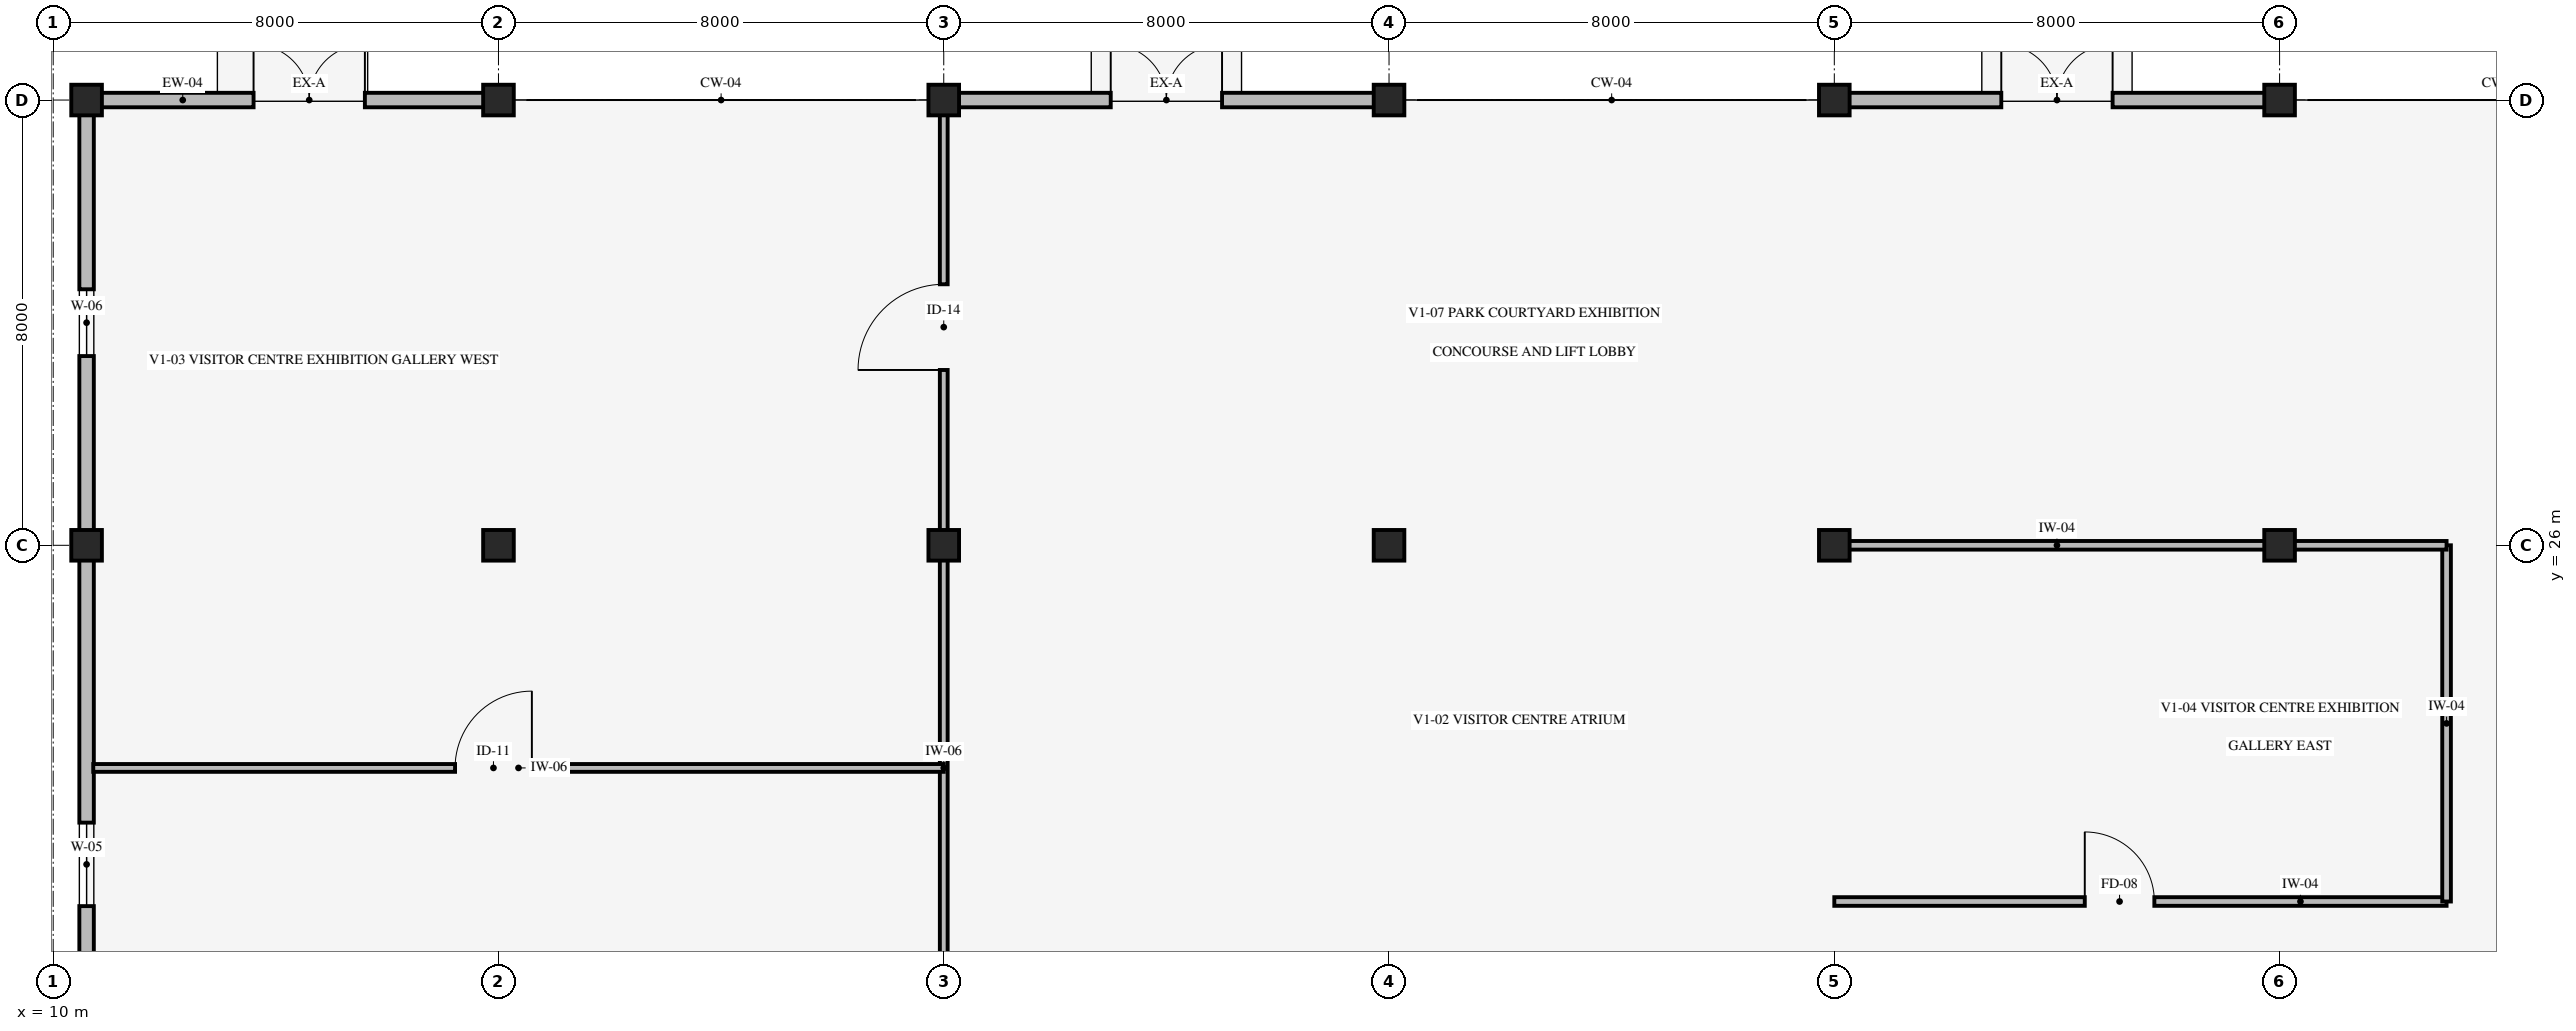
"""IFC4 building model, lengths in metres.
Left out: names, types, materials, properties, quantities, classifications, styles, units other than length and angle.
Written with IfcOpenShell. Run it as: python <this file> out.ifc"""

import sys

from ifc_helpers import new_model, si_unit, direction, frame, frame_2d, origin, origin_2d, place, context, subcontext, project, spatial, rectangle, extrude, element, fill, save


model = new_model("IFC4")
c1 = context("Model", 3, precision=1e-05, world=origin(), true_north=direction((0.0, 1.0)))
c2 = subcontext(c1, "Body", "Model", "MODEL_VIEW")
j1 = project(units=[si_unit("LENGTHUNIT", "METRE"), si_unit("PLANEANGLEUNIT", "RADIAN")], contexts=[c1])
p1 = place(None, origin())
s1 = spatial("IfcSite", under=j1, at=p1, CompositionType="ELEMENT")
p2 = place(p1, origin())
s2 = spatial("IfcBuilding", under=s1, at=p2, CompositionType="ELEMENT")
p3 = place(p2, origin())
s3 = spatial("IfcBuildingStorey", under=s2, at=p3, CompositionType="ELEMENT", Elevation=0.0)
for number, where, z_axis, x_axis in (
    (1, (10.6, 26.0, -0.28), (0.0, 0.0, 1.0), (1.0, 0.0, 0.0)),
    (2, (10.6, 34.0, -0.28), (0.0, 0.0, 1.0), (1.0, 0.0, 0.0)),
    (3, (18.0, 26.0, -0.28), (0.0, 0.0, 1.0), (1.0, 0.0, 0.0)),
    (4, (18.0, 34.0, -0.28), (0.0, 0.0, 1.0), (1.0, 0.0, 0.0)),
    (5, (26.0, 26.0, -0.28), (0.0, 0.0, 1.0), (1.0, 0.0, 0.0)),
    (6, (26.0, 34.0, -0.28), (0.0, 0.0, 1.0), (1.0, 0.0, 0.0)),
    (7, (34.0, 26.0, -0.28), (0.0, 0.0, 1.0), (1.0, 0.0, 0.0)),
    (8, (34.0, 34.0, -0.28), (0.0, 0.0, 1.0), (1.0, 0.0, 0.0)),
    (9, (42.0, 26.0, -0.28), (0.0, 0.0, 1.0), (1.0, 0.0, 0.0)),
    (10, (42.0, 34.0, -0.28), (0.0, 0.0, 1.0), (1.0, 0.0, 0.0)),
    (11, (50.0, 26.0, -0.28), (0.0, 0.0, 1.0), (1.0, 0.0, 0.0)),
    (12, (50.0, 34.0, -0.28), (0.0, 0.0, 1.0), (1.0, 0.0, 0.0)),
):
    element("IfcColumn", number, at=place(p3, frame(where, z_axis=z_axis, x_axis=x_axis)), inside=s3, PredefinedType="COLUMN", context=c2, shape_type="SweptSolid", body=[
        extrude(rectangle(XDim=0.55, YDim=0.55, at=origin_2d()), origin(), (0.0, 0.0, 1.0), 5.68),
    ])
p4 = place(p3, frame((10.6, 18.0, 0.0), z_axis=(0.0, 0.0, 1.0), x_axis=(0.0, 1.0, 0.0)))
e13 = element("IfcWall", 13, at=p4, inside=s3, PredefinedType="STANDARD", context=c2, shape_type="SweptSolid", body=[
    extrude(rectangle(XDim=8.0, YDim=0.26, at=frame_2d((4.0, 0.0))), origin(), (0.0, 0.0, 1.0), 4.61),
])
p5 = place(p4, frame((1.517, 0.0, 0.85)))
e14 = element("IfcOpeningElement", 14, at=p5, cuts=e13, PredefinedType="OPENING", context=c2, shape_type="SweptSolid", body=[
    extrude(rectangle(XDim=1.5, YDim=1.5, at=frame_2d((0.75, 0.75))), frame((0.0, 0.14, 0.0), z_axis=(0.0, -1.0, 0.0), x_axis=(1.0, 0.0, 0.0)), (0.0, 0.0, 1.0), 0.28),
])
p6 = place(p3, frame((10.6, 26.0, 0.0), z_axis=(0.0, 0.0, 1.0), x_axis=(0.0, 1.0, 0.0)))
e15 = element("IfcWall", 15, at=p6, inside=s3, PredefinedType="STANDARD", context=c2, shape_type="SweptSolid", body=[
    extrude(rectangle(XDim=8.0, YDim=0.26, at=frame_2d((4.0, 0.0))), origin(), (0.0, 0.0, 1.0), 4.61),
])
p7 = place(p6, frame((3.4, 0.0, 0.85)))
e16 = element("IfcOpeningElement", 16, at=p7, cuts=e15, PredefinedType="OPENING", context=c2, shape_type="SweptSolid", body=[
    extrude(rectangle(XDim=1.2, YDim=1.2, at=frame_2d((0.6, 0.6))), frame((0.0, 0.14, 0.0), z_axis=(0.0, -1.0, 0.0), x_axis=(1.0, 0.0, 0.0)), (0.0, 0.0, 1.0), 0.28),
])
p8 = place(p3, frame((10.6, 34.0, 0.0), z_axis=(0.0, 0.0, 1.0), x_axis=(1.0, 0.0, 0.0)))
e17 = element("IfcWall", 17, at=p8, inside=s3, PredefinedType="STANDARD", context=c2, shape_type="SweptSolid", body=[
    extrude(rectangle(XDim=7.4, YDim=0.26, at=frame_2d((3.7, 0.0))), origin(), (0.0, 0.0, 1.0), 4.61),
])
p9 = place(p8, frame((3.0, 0.0, 0.0)))
e18 = element("IfcOpeningElement", 18, at=p9, cuts=e17, PredefinedType="OPENING", context=c2, shape_type="SweptSolid", body=[
    extrude(rectangle(XDim=2.0, YDim=2.4, at=frame_2d((1.0, 1.2))), frame((0.0, 0.14, 0.0), z_axis=(0.0, -1.0, 0.0), x_axis=(1.0, 0.0, 0.0)), (0.0, 0.0, 1.0), 0.28),
])
p10 = place(p3, frame((26.0, 34.0, 0.0), z_axis=(0.0, 0.0, 1.0), x_axis=(1.0, 0.0, 0.0)))
e19 = element("IfcWall", 19, at=p10, inside=s3, PredefinedType="STANDARD", context=c2, shape_type="SweptSolid", body=[
    extrude(rectangle(XDim=8.0, YDim=0.26, at=frame_2d((4.0, 0.0))), origin(), (0.0, 0.0, 1.0), 4.54),
])
p11 = place(p10, frame((3.0, 0.0, 0.0)))
e20 = element("IfcOpeningElement", 20, at=p11, cuts=e19, PredefinedType="OPENING", context=c2, shape_type="SweptSolid", body=[
    extrude(rectangle(XDim=2.0, YDim=2.4, at=frame_2d((1.0, 1.2))), frame((0.0, 0.14, 0.0), z_axis=(0.0, -1.0, 0.0), x_axis=(1.0, 0.0, 0.0)), (0.0, 0.0, 1.0), 0.28),
])
p12 = place(p3, frame((42.0, 34.0, 0.0), z_axis=(0.0, 0.0, 1.0), x_axis=(1.0, 0.0, 0.0)))
e21 = element("IfcWall", 21, at=p12, inside=s3, PredefinedType="STANDARD", context=c2, shape_type="SweptSolid", body=[
    extrude(rectangle(XDim=8.0, YDim=0.26, at=frame_2d((4.0, 0.0))), origin(), (0.0, 0.0, 1.0), 4.54),
])
p13 = place(p12, frame((3.0, 0.0, 0.0)))
e22 = element("IfcOpeningElement", 22, at=p13, cuts=e21, PredefinedType="OPENING", context=c2, shape_type="SweptSolid", body=[
    extrude(rectangle(XDim=2.0, YDim=2.4, at=frame_2d((1.0, 1.2))), frame((0.0, 0.14, 0.0), z_axis=(0.0, -1.0, 0.0), x_axis=(1.0, 0.0, 0.0)), (0.0, 0.0, 1.0), 0.28),
])
p14 = place(p3, frame((26.0, 10.65, 0.0), z_axis=(0.0, 0.0, 1.0), x_axis=(0.0, 1.0, 0.0)))
e23 = element("IfcWall", 23, at=p14, inside=s3, PredefinedType="STANDARD", context=c2, shape_type="SweptSolid", body=[
    extrude(rectangle(XDim=23.3, YDim=0.14, at=frame_2d((11.65, 0.0))), origin(), (0.0, 0.0, 1.0), 4.59),
])
p15 = place(p14, frame((18.5, 0.0, 0.0)))
e24 = element("IfcOpeningElement", 24, at=p15, cuts=e23, PredefinedType="OPENING", context=c2, shape_type="SweptSolid", body=[
    extrude(rectangle(XDim=1.54, YDim=2.22, at=frame_2d((0.77, 1.11))), frame((0.0, 0.08, 0.0), z_axis=(0.0, -1.0, 0.0), x_axis=(1.0, 0.0, 0.0)), (0.0, 0.0, 1.0), 0.16),
])
p16 = place(p3, frame((10.72, 22.0, 0.0), z_axis=(0.0, 0.0, 1.0), x_axis=(1.0, 0.0, 0.0)))
e25 = element("IfcWall", 25, at=p16, inside=s3, PredefinedType="STANDARD", context=c2, shape_type="SweptSolid", body=[
    extrude(rectangle(XDim=15.28, YDim=0.14, at=frame_2d((7.64, 0.0))), origin(), (0.0, 0.0, 1.0), 5.1),
])
p17 = place(p16, frame((6.5, 0.0, 0.0)))
e26 = element("IfcOpeningElement", 26, at=p17, cuts=e25, PredefinedType="OPENING", context=c2, shape_type="SweptSolid", body=[
    extrude(rectangle(XDim=1.38, YDim=2.16, at=frame_2d((0.69, 1.08))), frame((0.0, 0.08, 0.0), z_axis=(0.0, -1.0, 0.0), x_axis=(1.0, 0.0, 0.0)), (0.0, 0.0, 1.0), 0.16),
])
p18 = place(p3, frame((42.0, 19.6, 0.0), z_axis=(0.0, 0.0, 1.0), x_axis=(1.0, 0.0, 0.0)))
e27 = element("IfcWall", 27, at=p18, inside=s3, PredefinedType="STANDARD", context=c2, shape_type="SweptSolid", body=[
    extrude(rectangle(XDim=11.0, YDim=0.155, at=frame_2d((5.5, 0.0))), origin(), (0.0, 0.0, 1.0), 5.1),
])
p19 = place(p18, frame((4.5, 0.0, 0.0)))
e28 = element("IfcOpeningElement", 28, at=p19, cuts=e27, PredefinedType="OPENING", context=c2, shape_type="SweptSolid", body=[
    extrude(rectangle(XDim=1.25, YDim=2.15, at=frame_2d((0.625, 1.075))), frame((0.0, 0.087, 0.0), z_axis=(0.0, -1.0, 0.0), x_axis=(1.0, 0.0, 0.0)), (0.0, 0.0, 1.0), 0.175),
])
p20 = place(p3, frame((53.0, 19.6, 0.0), z_axis=(0.0, 0.0, 1.0), x_axis=(0.0, 1.0, 0.0)))
e29 = element("IfcWall", 29, at=p20, inside=s3, PredefinedType="STANDARD", context=c2, shape_type="SweptSolid", body=[
    extrude(rectangle(XDim=6.4, YDim=0.155, at=frame_2d((3.2, 0.0))), origin(), (0.0, 0.0, 1.0), 5.1),
])
p21 = place(p3, frame((42.0, 26.0, 0.0), z_axis=(0.0, 0.0, 1.0), x_axis=(1.0, 0.0, 0.0)))
e30 = element("IfcWall", 30, at=p21, inside=s3, PredefinedType="STANDARD", context=c2, shape_type="SweptSolid", body=[
    extrude(rectangle(XDim=11.0, YDim=0.155, at=frame_2d((5.5, 0.0))), origin(), (0.0, 0.0, 1.0), 4.54),
])
p22 = place(p5, origin())
e31 = element("IfcWindow", 31, at=p22, inside=s3, PartitioningType="SINGLE_PANEL", PredefinedType="WINDOW", context=c2, shape_type="SweptSolid", body=[
    extrude(rectangle(XDim=1.5, YDim=1.5, at=frame_2d((0.75, 0.75))), frame((0.0, 0.03, 0.0), z_axis=(0.0, -1.0, 0.0), x_axis=(1.0, 0.0, 0.0)), (0.0, 0.0, 1.0), 0.06),
])
fill(e14, e31)
p23 = place(p7, origin())
e32 = element("IfcWindow", 32, at=p23, inside=s3, PartitioningType="SINGLE_PANEL", PredefinedType="WINDOW", context=c2, shape_type="SweptSolid", body=[
    extrude(rectangle(XDim=1.2, YDim=1.2, at=frame_2d((0.6, 0.6))), frame((0.0, 0.03, 0.0), z_axis=(0.0, -1.0, 0.0), x_axis=(1.0, 0.0, 0.0)), (0.0, 0.0, 1.0), 0.06),
])
fill(e16, e32)
p24 = place(p9, origin())
e33 = element("IfcDoor", 33, at=p24, inside=s3, OperationType="DOUBLE_DOOR_SINGLE_SWING", PredefinedType="DOOR", context=c2, shape_type="SweptSolid", body=[
    extrude(rectangle(XDim=2.0, YDim=2.4, at=frame_2d((1.0, 1.2))), frame((0.0, 0.025, 0.0), z_axis=(0.0, -1.0, 0.0), x_axis=(1.0, 0.0, 0.0)), (0.0, 0.0, 1.0), 0.05),
])
fill(e18, e33)
p25 = place(p11, origin())
e34 = element("IfcDoor", 34, at=p25, inside=s3, OperationType="DOUBLE_DOOR_SINGLE_SWING", PredefinedType="DOOR", context=c2, shape_type="SweptSolid", body=[
    extrude(rectangle(XDim=2.0, YDim=2.4, at=frame_2d((1.0, 1.2))), frame((0.0, 0.025, 0.0), z_axis=(0.0, -1.0, 0.0), x_axis=(1.0, 0.0, 0.0)), (0.0, 0.0, 1.0), 0.05),
])
fill(e20, e34)
p26 = place(p13, origin())
e35 = element("IfcDoor", 35, at=p26, inside=s3, OperationType="DOUBLE_DOOR_SINGLE_SWING", PredefinedType="DOOR", context=c2, shape_type="SweptSolid", body=[
    extrude(rectangle(XDim=2.0, YDim=2.4, at=frame_2d((1.0, 1.2))), frame((0.0, 0.025, 0.0), z_axis=(0.0, -1.0, 0.0), x_axis=(1.0, 0.0, 0.0)), (0.0, 0.0, 1.0), 0.05),
])
fill(e22, e35)
p27 = place(p15, origin())
e36 = element("IfcDoor", 36, at=p27, inside=s3, OperationType="SINGLE_SWING_LEFT", PredefinedType="DOOR", context=c2, shape_type="SweptSolid", body=[
    extrude(rectangle(XDim=1.54, YDim=2.22, at=frame_2d((0.77, 1.11))), frame((0.0, 0.025, 0.0), z_axis=(0.0, -1.0, 0.0), x_axis=(1.0, 0.0, 0.0)), (0.0, 0.0, 1.0), 0.05),
])
fill(e24, e36)
p28 = place(p17, origin())
e37 = element("IfcDoor", 37, at=p28, inside=s3, OperationType="SINGLE_SWING_RIGHT", PredefinedType="DOOR", context=c2, shape_type="SweptSolid", body=[
    extrude(rectangle(XDim=1.38, YDim=2.16, at=frame_2d((0.69, 1.08))), frame((0.0, 0.025, 0.0), z_axis=(0.0, -1.0, 0.0), x_axis=(1.0, 0.0, 0.0)), (0.0, 0.0, 1.0), 0.05),
])
fill(e26, e37)
p29 = place(p19, origin())
e38 = element("IfcDoor", 38, at=p29, inside=s3, OperationType="SINGLE_SWING_LEFT", PredefinedType="DOOR", context=c2, shape_type="SweptSolid", body=[
    extrude(rectangle(XDim=1.25, YDim=2.15, at=frame_2d((0.625, 1.075))), frame((0.0, 0.025, 0.0), z_axis=(0.0, -1.0, 0.0), x_axis=(1.0, 0.0, 0.0)), (0.0, 0.0, 1.0), 0.05),
])
fill(e28, e38)
save(model, sys.argv[1])
